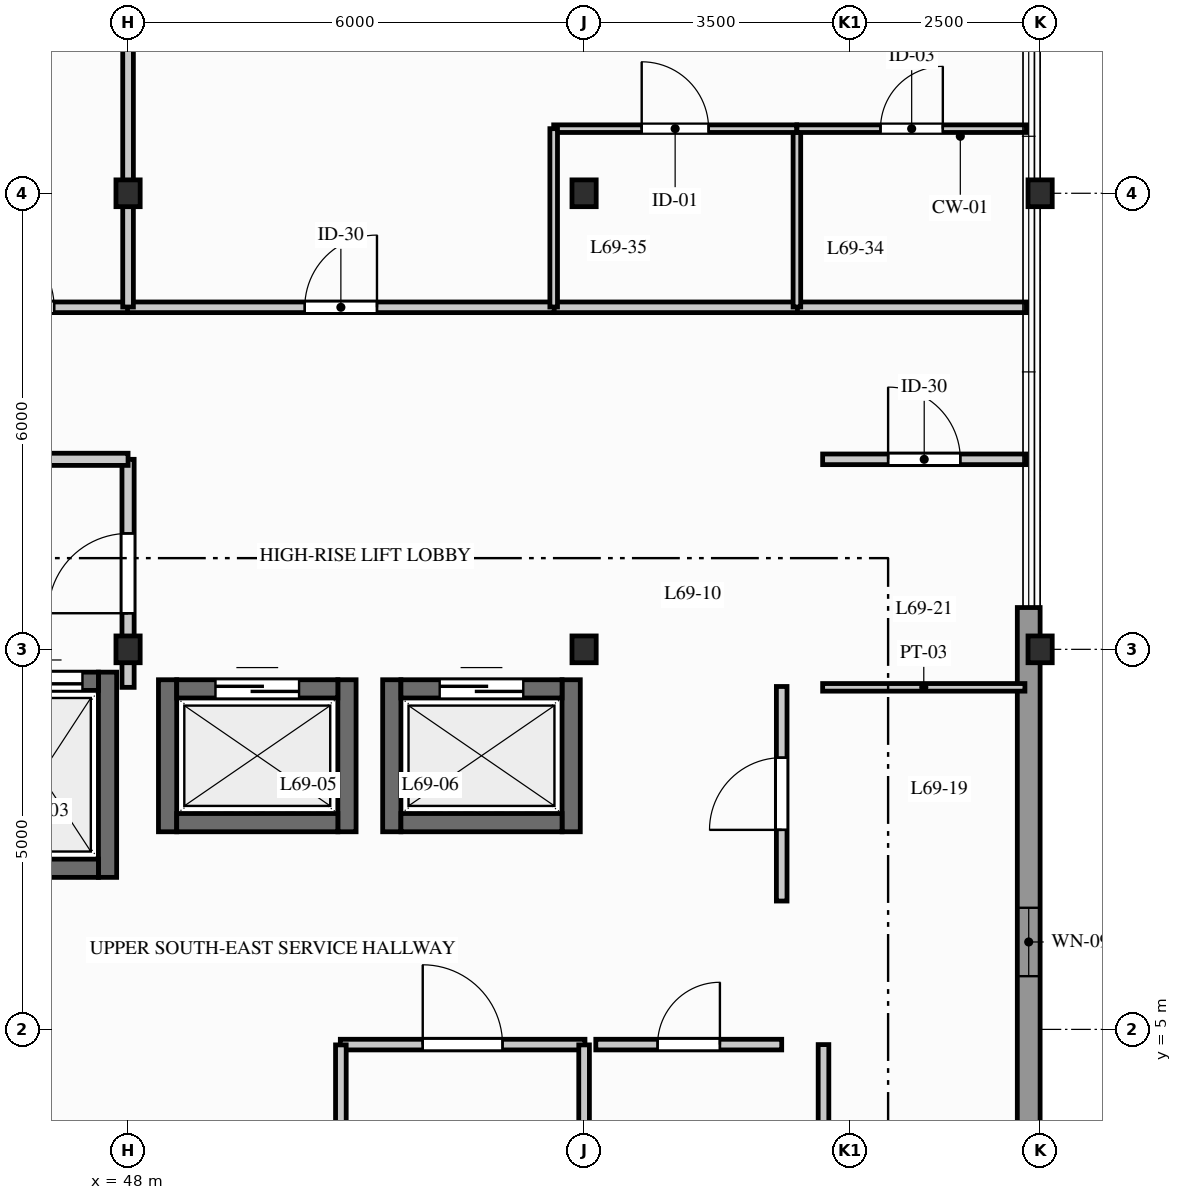
"""IFC4 building model, lengths in metres.
Left out: names, types, materials, properties, quantities, classifications, styles, units other than length and angle.
Written with IfcOpenShell. Run it as: python <this file> out.ifc"""

import sys

from ifc_helpers import new_model, si_unit, direction, frame, frame_2d, origin, origin_2d, place, context, subcontext, project, spatial, rectangle, i_section, extrude, element, fill, save


model = new_model("IFC4")
c1 = context("Model", 3, precision=1e-05, world=origin(), true_north=direction((0.0, 1.0)))
c2 = subcontext(c1, "Body", "Model", "MODEL_VIEW")
j1 = project(units=[si_unit("LENGTHUNIT", "METRE"), si_unit("PLANEANGLEUNIT", "RADIAN")], contexts=[c1])
p1 = place(None, origin())
s1 = spatial("IfcSite", under=j1, at=p1, CompositionType="ELEMENT")
p2 = place(p1, origin())
s2 = spatial("IfcBuilding", under=s1, at=p2, CompositionType="ELEMENT")
p3 = place(p2, frame((0.0, 0.0, 227.3)))
s3 = spatial("IfcBuildingStorey", under=s2, at=p3, CompositionType="ELEMENT", Elevation=227.3)
for number, where, z_axis, x_axis in (
    (1, (48.0, 10.0, 0.0), (0.0, 0.0, 1.0), (1.0, 0.0, 0.0)),
    (2, (48.0, 16.0, 0.0), (0.0, 0.0, 1.0), (1.0, 0.0, 0.0)),
    (3, (54.0, 10.0, 0.0), (0.0, 0.0, 1.0), (1.0, 0.0, 0.0)),
    (4, (54.0, 16.0, 0.0), (0.0, 0.0, 1.0), (1.0, 0.0, 0.0)),
    (5, (60.0, 10.0, 0.0), (0.0, 0.0, 1.0), (1.0, 0.0, 0.0)),
    (6, (60.0, 16.0, 0.0), (0.0, 0.0, 1.0), (1.0, 0.0, 0.0)),
):
    element("IfcColumn", number, at=place(p3, frame(where, z_axis=z_axis, x_axis=x_axis)), inside=s3, PredefinedType="COLUMN", context=c2, shape_type="SweptSolid", body=[
        extrude(i_section(OverallWidth=0.318, OverallDepth=0.353, WebThickness=0.023, FlangeThickness=0.038, FilletRadius=0.015, at=origin_2d()), origin(), (0.0, 0.0, 1.0), 3.1),
    ])
p4 = place(p3, frame((59.85, 2.5, 0.0), z_axis=(0.0, 0.0, 1.0), x_axis=(0.0, 1.0, 0.0)))
e7 = element("IfcWall", 7, at=p4, inside=s3, PredefinedType="STANDARD", context=c2, shape_type="SweptSolid", body=[
    extrude(rectangle(XDim=8.05, YDim=0.3, at=frame_2d((4.025, 0.0))), origin(), (0.0, 0.0, 1.0), 2.89),
])
p5 = place(p4, frame((3.2, 0.0, 1.2)))
e8 = element("IfcOpeningElement", 8, at=p5, cuts=e7, PredefinedType="OPENING", context=c2, shape_type="SweptSolid", body=[
    extrude(rectangle(XDim=0.9, YDim=0.9, at=frame_2d((0.45, 0.45))), frame((0.0, 0.16, 0.0), z_axis=(0.0, -1.0, 0.0), x_axis=(1.0, 0.0, 0.0)), (0.0, 0.0, 1.0), 0.32),
])
p6 = place(p3, frame((47.73, 7.0, 0.0), z_axis=(0.0, 0.0, 1.0), x_axis=(0.0, 1.0, 0.0)))
e9 = element("IfcWall", 9, at=p6, inside=s3, PredefinedType="SHEAR", context=c2, shape_type="SweptSolid", body=[
    extrude(rectangle(XDim=2.7, YDim=0.24, at=frame_2d((1.35, 0.0))), origin(), (0.0, 0.0, 1.0), 2.89),
])
p7 = place(p3, frame((46.09, 7.12, 0.0), z_axis=(0.0, 0.0, 1.0), x_axis=(1.0, 0.0, 0.0)))
e10 = element("IfcWall", 10, at=p7, inside=s3, PredefinedType="SHEAR", context=c2, shape_type="SweptSolid", body=[
    extrude(rectangle(XDim=1.52, YDim=0.24, at=frame_2d((0.76, 0.0))), origin(), (0.0, 0.0, 1.0), 2.89),
])
p8 = place(p3, frame((46.09, 9.58, 0.0), z_axis=(0.0, 0.0, 1.0), x_axis=(1.0, 0.0, 0.0)))
e11 = element("IfcWall", 11, at=p8, inside=s3, PredefinedType="SHEAR", context=c2, shape_type="SweptSolid", body=[
    extrude(rectangle(XDim=1.52, YDim=0.24, at=frame_2d((0.76, 0.0))), origin(), (0.0, 0.0, 1.0), 2.89),
])
p9 = place(p8, frame((0.21, 0.0, 0.0)))
e12 = element("IfcOpeningElement", 12, at=p9, cuts=e11, PredefinedType="OPENING", context=c2, shape_type="SweptSolid", body=[
    extrude(rectangle(XDim=1.1, YDim=2.06, at=frame_2d((0.55, 1.03))), frame((0.0, 0.13, 0.0), z_axis=(0.0, -1.0, 0.0), x_axis=(1.0, 0.0, 0.0)), (0.0, 0.0, 1.0), 0.26),
])
for number, where, z_axis, x_axis in (
    (13, (48.52, 7.6, 0.0), (0.0, 0.0, 1.0), (0.0, 1.0, 0.0)),
    (14, (50.88, 7.6, 0.0), (0.0, 0.0, 1.0), (0.0, 1.0, 0.0)),
):
    element("IfcWall", number, at=place(p3, frame(where, z_axis=z_axis, x_axis=x_axis)), inside=s3, PredefinedType="SHEAR", context=c2, shape_type="SweptSolid", body=[
        extrude(rectangle(XDim=2.0, YDim=0.24, at=frame_2d((1.0, 0.0))), origin(), (0.0, 0.0, 1.0), 2.89),
    ])
p10 = place(p3, frame((48.64, 7.72, 0.0), z_axis=(0.0, 0.0, 1.0), x_axis=(1.0, 0.0, 0.0)))
e15 = element("IfcWall", 15, at=p10, inside=s3, PredefinedType="SHEAR", context=c2, shape_type="SweptSolid", body=[
    extrude(rectangle(XDim=2.12, YDim=0.24, at=frame_2d((1.06, 0.0))), origin(), (0.0, 0.0, 1.0), 2.89),
])
p11 = place(p3, frame((48.64, 9.48, 0.0), z_axis=(0.0, 0.0, 1.0), x_axis=(1.0, 0.0, 0.0)))
e16 = element("IfcWall", 16, at=p11, inside=s3, PredefinedType="SHEAR", context=c2, shape_type="SweptSolid", body=[
    extrude(rectangle(XDim=2.12, YDim=0.24, at=frame_2d((1.06, 0.0))), origin(), (0.0, 0.0, 1.0), 2.89),
])
p12 = place(p11, frame((0.51, 0.0, 0.0)))
e17 = element("IfcOpeningElement", 17, at=p12, cuts=e16, PredefinedType="OPENING", context=c2, shape_type="SweptSolid", body=[
    extrude(rectangle(XDim=1.1, YDim=2.06, at=frame_2d((0.55, 1.03))), frame((0.0, 0.13, 0.0), z_axis=(0.0, -1.0, 0.0), x_axis=(1.0, 0.0, 0.0)), (0.0, 0.0, 1.0), 0.26),
])
for number, where, z_axis, x_axis in (
    (18, (51.47, 7.6, 0.0), (0.0, 0.0, 1.0), (0.0, 1.0, 0.0)),
    (19, (53.83, 7.6, 0.0), (0.0, 0.0, 1.0), (0.0, 1.0, 0.0)),
):
    element("IfcWall", number, at=place(p3, frame(where, z_axis=z_axis, x_axis=x_axis)), inside=s3, PredefinedType="SHEAR", context=c2, shape_type="SweptSolid", body=[
        extrude(rectangle(XDim=2.0, YDim=0.24, at=frame_2d((1.0, 0.0))), origin(), (0.0, 0.0, 1.0), 2.89),
    ])
p13 = place(p3, frame((51.59, 7.72, 0.0), z_axis=(0.0, 0.0, 1.0), x_axis=(1.0, 0.0, 0.0)))
e20 = element("IfcWall", 20, at=p13, inside=s3, PredefinedType="SHEAR", context=c2, shape_type="SweptSolid", body=[
    extrude(rectangle(XDim=2.12, YDim=0.24, at=frame_2d((1.06, 0.0))), origin(), (0.0, 0.0, 1.0), 2.89),
])
p14 = place(p3, frame((51.59, 9.48, 0.0), z_axis=(0.0, 0.0, 1.0), x_axis=(1.0, 0.0, 0.0)))
e21 = element("IfcWall", 21, at=p14, inside=s3, PredefinedType="SHEAR", context=c2, shape_type="SweptSolid", body=[
    extrude(rectangle(XDim=2.12, YDim=0.24, at=frame_2d((1.06, 0.0))), origin(), (0.0, 0.0, 1.0), 2.89),
])
p15 = place(p14, frame((0.51, 0.0, 0.0)))
e22 = element("IfcOpeningElement", 22, at=p15, cuts=e21, PredefinedType="OPENING", context=c2, shape_type="SweptSolid", body=[
    extrude(rectangle(XDim=1.1, YDim=2.06, at=frame_2d((0.55, 1.03))), frame((0.0, 0.13, 0.0), z_axis=(0.0, -1.0, 0.0), x_axis=(1.0, 0.0, 0.0)), (0.0, 0.0, 1.0), 0.26),
])
p16 = place(p3, frame((50.793, 4.8, 0.0), z_axis=(0.0, 0.0, 1.0), x_axis=(1.0, 0.0, 0.0)))
e23 = element("IfcWall", 23, at=p16, inside=s3, PredefinedType="PARTITIONING", context=c2, shape_type="SweptSolid", body=[
    extrude(rectangle(XDim=3.219, YDim=0.14, at=frame_2d((1.609, 0.0))), origin(), (0.0, 0.0, 1.0), 2.325),
])
p17 = place(p16, frame((1.084, 0.0, 0.0)))
e24 = element("IfcOpeningElement", 24, at=p17, cuts=e23, PredefinedType="OPENING", context=c2, shape_type="SweptSolid", body=[
    extrude(rectangle(XDim=1.05, YDim=2.06, at=frame_2d((0.525, 1.03))), frame((0.0, 0.08, 0.0), z_axis=(0.0, -1.0, 0.0), x_axis=(1.0, 0.0, 0.0)), (0.0, 0.0, 1.0), 0.16),
])
p18 = place(p3, frame((54.154, 4.8, 0.0), z_axis=(0.0, 0.0, 1.0), x_axis=(1.0, 0.0, 0.0)))
e25 = element("IfcWall", 25, at=p18, inside=s3, PredefinedType="PARTITIONING", context=c2, shape_type="SweptSolid", body=[
    extrude(rectangle(XDim=2.446, YDim=0.14, at=frame_2d((1.223, 0.0))), origin(), (0.0, 0.0, 1.0), 2.89),
])
p19 = place(p18, frame((0.813, 0.0, 0.0)))
e26 = element("IfcOpeningElement", 26, at=p19, cuts=e25, PredefinedType="OPENING", context=c2, shape_type="SweptSolid", body=[
    extrude(rectangle(XDim=0.82, YDim=2.02, at=frame_2d((0.41, 1.01))), frame((0.0, 0.08, 0.0), z_axis=(0.0, -1.0, 0.0), x_axis=(1.0, 0.0, 0.0)), (0.0, 0.0, 1.0), 0.16),
])
p20 = place(p3, frame((56.6, 6.689, 0.0), z_axis=(0.0, 0.0, 1.0), x_axis=(0.0, 1.0, 0.0)))
e27 = element("IfcWall", 27, at=p20, inside=s3, PredefinedType="PARTITIONING", context=c2, shape_type="SweptSolid", body=[
    extrude(rectangle(XDim=2.823, YDim=0.14, at=frame_2d((1.411, 0.0))), origin(), (0.0, 0.0, 1.0), 2.89),
])
p21 = place(p20, frame((0.936, 0.0, 0.0)))
e28 = element("IfcOpeningElement", 28, at=p21, cuts=e27, PredefinedType="OPENING", context=c2, shape_type="SweptSolid", body=[
    extrude(rectangle(XDim=0.95, YDim=2.05, at=frame_2d((0.475, 1.025))), frame((0.0, 0.08, 0.0), z_axis=(0.0, -1.0, 0.0), x_axis=(1.0, 0.0, 0.0)), (0.0, 0.0, 1.0), 0.16),
])
p22 = place(p3, frame((50.8, 0.18, 0.0), z_axis=(0.0, 0.0, 1.0), x_axis=(0.0, 1.0, 0.0)))
e29 = element("IfcWall", 29, at=p22, inside=s3, PredefinedType="PARTITIONING", context=c2, shape_type="SweptSolid", body=[
    extrude(rectangle(XDim=4.616, YDim=0.14, at=frame_2d((2.308, 0.0))), origin(), (0.0, 0.0, 1.0), 2.89),
])
p23 = place(p3, frame((54.0, 0.18, 0.0), z_axis=(0.0, 0.0, 1.0), x_axis=(0.0, 1.0, 0.0)))
e30 = element("IfcWall", 30, at=p23, inside=s3, PredefinedType="PARTITIONING", context=c2, shape_type="SweptSolid", body=[
    extrude(rectangle(XDim=4.616, YDim=0.14, at=frame_2d((2.308, 0.0))), origin(), (0.0, 0.0, 1.0), 2.325),
])
p24 = place(p3, frame((48.0, 9.5, 0.0), z_axis=(0.0, 0.0, 1.0), x_axis=(0.0, 1.0, 0.0)))
e31 = element("IfcWall", 31, at=p24, inside=s3, PredefinedType="PARTITIONING", context=c2, shape_type="SweptSolid", body=[
    extrude(rectangle(XDim=3.0, YDim=0.16, at=frame_2d((1.5, 0.0))), origin(), (0.0, 0.0, 1.0), 2.325),
])
p25 = place(p24, frame((0.975, 0.0, 0.0)))
e32 = element("IfcOpeningElement", 32, at=p25, cuts=e31, PredefinedType="OPENING", context=c2, shape_type="SweptSolid", body=[
    extrude(rectangle(XDim=1.05, YDim=2.06, at=frame_2d((0.525, 1.03))), frame((0.0, 0.09, 0.0), z_axis=(0.0, -1.0, 0.0), x_axis=(1.0, 0.0, 0.0)), (0.0, 0.0, 1.0), 0.18),
])
p26 = place(p3, frame((42.2, 12.5, 0.0), z_axis=(0.0, 0.0, 1.0), x_axis=(1.0, 0.0, 0.0)))
e33 = element("IfcWall", 33, at=p26, inside=s3, PredefinedType="PARTITIONING", context=c2, shape_type="SweptSolid", body=[
    extrude(rectangle(XDim=5.8, YDim=0.16, at=frame_2d((2.9, 0.0))), origin(), (0.0, 0.0, 1.0), 2.325),
])
p27 = place(p26, frame((2.375, 0.0, 0.0)))
e34 = element("IfcOpeningElement", 34, at=p27, cuts=e33, PredefinedType="OPENING", context=c2, shape_type="SweptSolid", body=[
    extrude(rectangle(XDim=1.05, YDim=2.06, at=frame_2d((0.525, 1.03))), frame((0.0, 0.09, 0.0), z_axis=(0.0, -1.0, 0.0), x_axis=(1.0, 0.0, 0.0)), (0.0, 0.0, 1.0), 0.18),
])
p28 = place(p3, frame((57.139, 9.5, 0.0), z_axis=(0.0, 0.0, 1.0), x_axis=(1.0, 0.0, 0.0)))
e35 = element("IfcWall", 35, at=p28, inside=s3, PredefinedType="PARTITIONING", context=c2, shape_type="SweptSolid", body=[
    extrude(rectangle(XDim=2.661, YDim=0.1, at=frame_2d((1.331, 0.0))), origin(), (0.0, 0.0, 1.0), 2.89),
])
p29 = place(p3, frame((57.139, 12.5, 0.0), z_axis=(0.0, 0.0, 1.0), x_axis=(1.0, 0.0, 0.0)))
e36 = element("IfcWall", 36, at=p29, inside=s3, PredefinedType="PARTITIONING", context=c2, shape_type="SweptSolid", body=[
    extrude(rectangle(XDim=2.673, YDim=0.14, at=frame_2d((1.336, 0.0))), origin(), (0.0, 0.0, 1.0), 2.89),
])
p30 = place(p29, frame((0.861, 0.0, 0.0)))
e37 = element("IfcOpeningElement", 37, at=p30, cuts=e36, PredefinedType="OPENING", context=c2, shape_type="SweptSolid", body=[
    extrude(rectangle(XDim=0.95, YDim=2.05, at=frame_2d((0.475, 1.025))), frame((0.0, 0.08, 0.0), z_axis=(0.0, -1.0, 0.0), x_axis=(1.0, 0.0, 0.0)), (0.0, 0.0, 1.0), 0.16),
])
p31 = place(p3, frame((45.093, 14.5, 0.0), z_axis=(0.0, 0.0, 1.0), x_axis=(1.0, 0.0, 0.0)))
e38 = element("IfcWall", 38, at=p31, inside=s3, PredefinedType="PARTITIONING", context=c2, shape_type="SweptSolid", body=[
    extrude(rectangle(XDim=2.918, YDim=0.14, at=frame_2d((1.459, 0.0))), origin(), (0.0, 0.0, 1.0), 2.325),
])
p32 = place(p31, frame((0.984, 0.0, 0.0)))
e39 = element("IfcOpeningElement", 39, at=p32, cuts=e38, PredefinedType="OPENING", context=c2, shape_type="SweptSolid", body=[
    extrude(rectangle(XDim=0.95, YDim=2.05, at=frame_2d((0.475, 1.025))), frame((0.0, 0.08, 0.0), z_axis=(0.0, -1.0, 0.0), x_axis=(1.0, 0.0, 0.0)), (0.0, 0.0, 1.0), 0.16),
])
p33 = place(p3, frame((56.789, 14.5, 0.0), z_axis=(0.0, 0.0, 1.0), x_axis=(1.0, 0.0, 0.0)))
e40 = element("IfcWall", 40, at=p33, inside=s3, PredefinedType="PARTITIONING", context=c2, shape_type="SweptSolid", body=[
    extrude(rectangle(XDim=3.031, YDim=0.14, at=frame_2d((1.516, 0.0))), origin(), (0.0, 0.0, 1.0), 2.89),
])
p34 = place(p3, frame((53.589, 14.5, 0.0), z_axis=(0.0, 0.0, 1.0), x_axis=(1.0, 0.0, 0.0)))
e41 = element("IfcWall", 41, at=p34, inside=s3, PredefinedType="PARTITIONING", context=c2, shape_type="SweptSolid", body=[
    extrude(rectangle(XDim=3.219, YDim=0.14, at=frame_2d((1.609, 0.0))), origin(), (0.0, 0.0, 1.0), 2.325),
])
p35 = place(p3, frame((47.993, 14.5, 0.0), z_axis=(0.0, 0.0, 1.0), x_axis=(1.0, 0.0, 0.0)))
e42 = element("IfcWall", 42, at=p35, inside=s3, PredefinedType="PARTITIONING", context=c2, shape_type="SweptSolid", body=[
    extrude(rectangle(XDim=5.615, YDim=0.14, at=frame_2d((2.807, 0.0))), origin(), (0.0, 0.0, 1.0), 2.325),
])
p36 = place(p35, frame((2.332, 0.0, 0.0)))
e43 = element("IfcOpeningElement", 43, at=p36, cuts=e42, PredefinedType="OPENING", context=c2, shape_type="SweptSolid", body=[
    extrude(rectangle(XDim=0.95, YDim=2.05, at=frame_2d((0.475, 1.025))), frame((0.0, 0.08, 0.0), z_axis=(0.0, -1.0, 0.0), x_axis=(1.0, 0.0, 0.0)), (0.0, 0.0, 1.0), 0.16),
])
p37 = place(p3, frame((48.0, 14.504, 0.0), z_axis=(0.0, 0.0, 1.0), x_axis=(0.0, 1.0, 0.0)))
e44 = element("IfcWall", 44, at=p37, inside=s3, PredefinedType="PARTITIONING", context=c2, shape_type="SweptSolid", body=[
    extrude(rectangle(XDim=7.253, YDim=0.14, at=frame_2d((3.627, 0.0))), origin(), (0.0, 0.0, 1.0), 2.325),
])
p38 = place(p3, frame((56.8, 14.504, 0.0), z_axis=(0.0, 0.0, 1.0), x_axis=(0.0, 1.0, 0.0)))
e45 = element("IfcWall", 45, at=p38, inside=s3, PredefinedType="PARTITIONING", context=c2, shape_type="SweptSolid", body=[
    extrude(rectangle(XDim=2.346, YDim=0.1, at=frame_2d((1.173, 0.0))), origin(), (0.0, 0.0, 1.0), 2.325),
])
p39 = place(p3, frame((56.8, 16.85, 0.0), z_axis=(0.0, 0.0, 1.0), x_axis=(1.0, 0.0, 0.0)))
e46 = element("IfcWall", 46, at=p39, inside=s3, PredefinedType="PARTITIONING", context=c2, shape_type="SweptSolid", body=[
    extrude(rectangle(XDim=3.02, YDim=0.1, at=frame_2d((1.51, 0.0))), origin(), (0.0, 0.0, 1.0), 2.89),
])
p40 = place(p39, frame((1.1, 0.0, 0.0)))
e47 = element("IfcOpeningElement", 47, at=p40, cuts=e46, PredefinedType="OPENING", context=c2, shape_type="SweptSolid", body=[
    extrude(rectangle(XDim=0.82, YDim=2.02, at=frame_2d((0.41, 1.01))), frame((0.0, 0.06, 0.0), z_axis=(0.0, -1.0, 0.0), x_axis=(1.0, 0.0, 0.0)), (0.0, 0.0, 1.0), 0.12),
])
p41 = place(p3, frame((53.6, 16.85, 0.0), z_axis=(0.0, 0.0, 1.0), x_axis=(1.0, 0.0, 0.0)))
e48 = element("IfcWall", 48, at=p41, inside=s3, PredefinedType="PARTITIONING", context=c2, shape_type="SweptSolid", body=[
    extrude(rectangle(XDim=3.196, YDim=0.1, at=frame_2d((1.598, 0.0))), origin(), (0.0, 0.0, 1.0), 2.325),
])
p42 = place(p41, frame((1.158, 0.0, 0.0)))
e49 = element("IfcOpeningElement", 49, at=p42, cuts=e48, PredefinedType="OPENING", context=c2, shape_type="SweptSolid", body=[
    extrude(rectangle(XDim=0.88, YDim=2.04, at=frame_2d((0.44, 1.02))), frame((0.0, 0.06, 0.0), z_axis=(0.0, -1.0, 0.0), x_axis=(1.0, 0.0, 0.0)), (0.0, 0.0, 1.0), 0.12),
])
p43 = place(p3, frame((53.6, 14.504, 0.0), z_axis=(0.0, 0.0, 1.0), x_axis=(0.0, 1.0, 0.0)))
e50 = element("IfcWall", 50, at=p43, inside=s3, PredefinedType="PARTITIONING", context=c2, shape_type="SweptSolid", body=[
    extrude(rectangle(XDim=2.346, YDim=0.1, at=frame_2d((1.173, 0.0))), origin(), (0.0, 0.0, 1.0), 2.325),
])
p44 = place(p3, frame((57.15, 0.39, 0.0), z_axis=(0.0, 0.0, 1.0), x_axis=(0.0, 1.0, 0.0)))
e51 = element("IfcWall", 51, at=p44, inside=s3, PredefinedType="PARTITIONING", context=c2, shape_type="SweptSolid", body=[
    extrude(rectangle(XDim=4.41, YDim=0.14, at=frame_2d((2.205, 0.0))), origin(), (0.0, 0.0, 1.0), 2.89),
])
p45 = place(p5, origin())
e52 = element("IfcWindow", 52, at=p45, inside=s3, PartitioningType="SINGLE_PANEL", PredefinedType="WINDOW", context=c2, shape_type="SweptSolid", body=[
    extrude(rectangle(XDim=0.9, YDim=0.9, at=frame_2d((0.45, 0.45))), frame((0.0, 0.03, 0.0), z_axis=(0.0, -1.0, 0.0), x_axis=(1.0, 0.0, 0.0)), (0.0, 0.0, 1.0), 0.06),
])
fill(e8, e52)
p46 = place(p9, origin())
e53 = element("IfcDoor", 53, at=p46, inside=s3, OperationType="SLIDING_TO_RIGHT", PredefinedType="DOOR", context=c2, shape_type="SweptSolid", body=[
    extrude(rectangle(XDim=1.1, YDim=2.06, at=frame_2d((0.55, 1.03))), frame((0.0, 0.025, 0.0), z_axis=(0.0, -1.0, 0.0), x_axis=(1.0, 0.0, 0.0)), (0.0, 0.0, 1.0), 0.05),
])
fill(e12, e53)
p47 = place(p12, origin())
e54 = element("IfcDoor", 54, at=p47, inside=s3, OperationType="SLIDING_TO_RIGHT", PredefinedType="DOOR", context=c2, shape_type="SweptSolid", body=[
    extrude(rectangle(XDim=1.1, YDim=2.06, at=frame_2d((0.55, 1.03))), frame((0.0, 0.025, 0.0), z_axis=(0.0, -1.0, 0.0), x_axis=(1.0, 0.0, 0.0)), (0.0, 0.0, 1.0), 0.05),
])
fill(e17, e54)
p48 = place(p15, origin())
e55 = element("IfcDoor", 55, at=p48, inside=s3, OperationType="SLIDING_TO_LEFT", PredefinedType="DOOR", context=c2, shape_type="SweptSolid", body=[
    extrude(rectangle(XDim=1.1, YDim=2.06, at=frame_2d((0.55, 1.03))), frame((0.0, 0.025, 0.0), z_axis=(0.0, -1.0, 0.0), x_axis=(1.0, 0.0, 0.0)), (0.0, 0.0, 1.0), 0.05),
])
fill(e22, e55)
p49 = place(p17, origin())
e56 = element("IfcDoor", 56, at=p49, inside=s3, OperationType="SINGLE_SWING_LEFT", PredefinedType="DOOR", context=c2, shape_type="SweptSolid", body=[
    extrude(rectangle(XDim=1.05, YDim=2.06, at=frame_2d((0.525, 1.03))), frame((0.0, 0.025, 0.0), z_axis=(0.0, -1.0, 0.0), x_axis=(1.0, 0.0, 0.0)), (0.0, 0.0, 1.0), 0.05),
])
fill(e24, e56)
p50 = place(p19, origin())
e57 = element("IfcDoor", 57, at=p50, inside=s3, OperationType="SINGLE_SWING_RIGHT", PredefinedType="DOOR", context=c2, shape_type="SweptSolid", body=[
    extrude(rectangle(XDim=0.82, YDim=2.02, at=frame_2d((0.41, 1.01))), frame((0.0, 0.025, 0.0), z_axis=(0.0, -1.0, 0.0), x_axis=(1.0, 0.0, 0.0)), (0.0, 0.0, 1.0), 0.05),
])
fill(e26, e57)
p51 = place(p21, origin())
e58 = element("IfcDoor", 58, at=p51, inside=s3, OperationType="SINGLE_SWING_LEFT", PredefinedType="DOOR", context=c2, shape_type="SweptSolid", body=[
    extrude(rectangle(XDim=0.95, YDim=2.05, at=frame_2d((0.475, 1.025))), frame((0.0, 0.025, 0.0), z_axis=(0.0, -1.0, 0.0), x_axis=(1.0, 0.0, 0.0)), (0.0, 0.0, 1.0), 0.05),
])
fill(e28, e58)
p52 = place(p25, origin())
e59 = element("IfcDoor", 59, at=p52, inside=s3, OperationType="SINGLE_SWING_LEFT", PredefinedType="DOOR", context=c2, shape_type="SweptSolid", body=[
    extrude(rectangle(XDim=1.05, YDim=2.06, at=frame_2d((0.525, 1.03))), frame((0.0, 0.025, 0.0), z_axis=(0.0, -1.0, 0.0), x_axis=(1.0, 0.0, 0.0)), (0.0, 0.0, 1.0), 0.05),
])
fill(e32, e59)
p53 = place(p30, origin())
e60 = element("IfcDoor", 60, at=p53, inside=s3, OperationType="SINGLE_SWING_LEFT", PredefinedType="DOOR", context=c2, shape_type="SweptSolid", body=[
    extrude(rectangle(XDim=0.95, YDim=2.05, at=frame_2d((0.475, 1.025))), frame((0.0, 0.025, 0.0), z_axis=(0.0, -1.0, 0.0), x_axis=(1.0, 0.0, 0.0)), (0.0, 0.0, 1.0), 0.05),
])
fill(e37, e60)
p54 = place(p32, origin())
e61 = element("IfcDoor", 61, at=p54, inside=s3, OperationType="SINGLE_SWING_LEFT", PredefinedType="DOOR", context=c2, shape_type="SweptSolid", body=[
    extrude(rectangle(XDim=0.95, YDim=2.05, at=frame_2d((0.475, 1.025))), frame((0.0, 0.025, 0.0), z_axis=(0.0, -1.0, 0.0), x_axis=(1.0, 0.0, 0.0)), (0.0, 0.0, 1.0), 0.05),
])
fill(e39, e61)
p55 = place(p36, origin())
e62 = element("IfcDoor", 62, at=p55, inside=s3, OperationType="SINGLE_SWING_RIGHT", PredefinedType="DOOR", context=c2, shape_type="SweptSolid", body=[
    extrude(rectangle(XDim=0.95, YDim=2.05, at=frame_2d((0.475, 1.025))), frame((0.0, 0.025, 0.0), z_axis=(0.0, -1.0, 0.0), x_axis=(1.0, 0.0, 0.0)), (0.0, 0.0, 1.0), 0.05),
])
fill(e43, e62)
p56 = place(p40, origin())
e63 = element("IfcDoor", 63, at=p56, inside=s3, OperationType="SINGLE_SWING_RIGHT", PredefinedType="DOOR", context=c2, shape_type="SweptSolid", body=[
    extrude(rectangle(XDim=0.82, YDim=2.02, at=frame_2d((0.41, 1.01))), frame((0.0, 0.025, 0.0), z_axis=(0.0, -1.0, 0.0), x_axis=(1.0, 0.0, 0.0)), (0.0, 0.0, 1.0), 0.05),
])
fill(e47, e63)
p57 = place(p42, origin())
e64 = element("IfcDoor", 64, at=p57, inside=s3, OperationType="SINGLE_SWING_LEFT", PredefinedType="DOOR", context=c2, shape_type="SweptSolid", body=[
    extrude(rectangle(XDim=0.88, YDim=2.04, at=frame_2d((0.44, 1.02))), frame((0.0, 0.025, 0.0), z_axis=(0.0, -1.0, 0.0), x_axis=(1.0, 0.0, 0.0)), (0.0, 0.0, 1.0), 0.05),
])
fill(e49, e64)
save(model, sys.argv[1])
